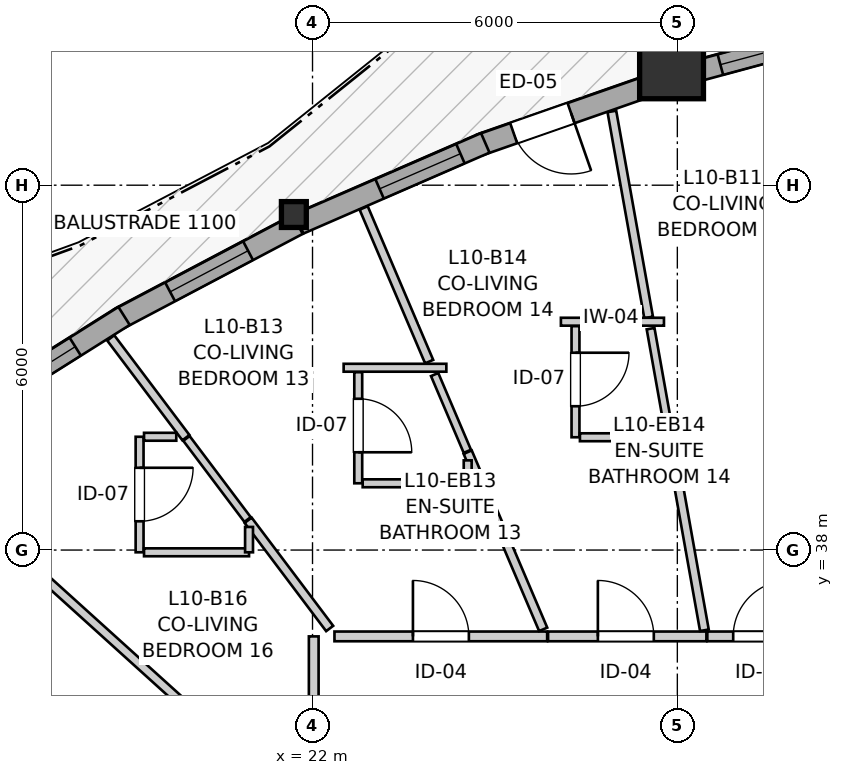
"""IFC4 building model, lengths in metres.
Left out: names, types, materials, properties, quantities, classifications, styles, units other than length and angle.
Written with IfcOpenShell. Run it as: python <this file> out.ifc"""

import sys

from ifc_helpers import new_model, si_unit, direction, frame, frame_2d, origin, origin_2d, place, context, subcontext, project, spatial, rectangle, i_section, extrude, source, transform, mapped, element, fill, save


model = new_model("IFC4")
c1 = context("Model", 3, precision=1e-05, world=origin(), true_north=direction((0.0, 1.0)))
c2 = subcontext(c1, "Body", "Model", "MODEL_VIEW")
j1 = project(units=[si_unit("LENGTHUNIT", "METRE"), si_unit("PLANEANGLEUNIT", "RADIAN")], contexts=[c1])
p1 = place(None, origin())
s1 = spatial("IfcSite", under=j1, at=p1, CompositionType="ELEMENT")
p2 = place(p1, origin())
s2 = spatial("IfcBuilding", under=s1, at=p2, CompositionType="ELEMENT")
p3 = place(p2, frame((0.0, 0.0, 36.6)))
s3 = spatial("IfcBuildingStorey", under=s2, at=p3, CompositionType="ELEMENT", Elevation=36.6)
m1 = source(origin(), c2, "Body", "SweptSolid", [
    extrude(rectangle(XDim=1.05, YDim=1.05, at=origin_2d()), origin(), (0.0, 0.0, 1.0), 2.94),
])
p4 = place(p3, frame((27.905, 45.947, 0.0), z_axis=(0.0, 0.0, 1.0), x_axis=(1.0, 0.0, 0.0)))
e1 = element("IfcColumn", 1, at=p4, inside=s3, PredefinedType="COLUMN", context=c2, shape_type="MappedRepresentation", body=[
    mapped(m1, transform((0.0, 0.0, 0.0), x_axis=(1.0, 0.0, 0.0), y_axis=(0.0, 1.0, 0.0), z_axis=(0.0, 0.0, 1.0), scale=1.0)),
])
m2 = source(origin(), c2, "Body", "SweptSolid", [
    extrude(i_section(OverallWidth=0.409, OverallDepth=0.425, WebThickness=0.03, FlangeThickness=0.048, FilletRadius=0.015, at=origin_2d()), origin(), (0.0, 0.0, 1.0), 2.94),
])
p5 = place(p3, frame((21.693, 43.518, 0.0), z_axis=(0.0, 0.0, 1.0), x_axis=(1.0, 0.0, 0.0)))
e2 = element("IfcColumn", 2, at=p5, inside=s3, PredefinedType="PILASTER", context=c2, shape_type="MappedRepresentation", body=[
    mapped(m2, transform((0.0, 0.0, 0.0), x_axis=(1.0, 0.0, 0.0), y_axis=(0.0, 1.0, 0.0), z_axis=(0.0, 0.0, 1.0), scale=1.0)),
])
p6 = place(p3, frame((31.281, 46.677, 0.0), z_axis=(0.0, 0.0, 1.0), x_axis=(-0.965445661484, -0.260604441101, 0.0)))
e3 = element("IfcWall", 3, at=p6, inside=s3, PredefinedType="SOLIDWALL", context=c2, shape_type="SweptSolid", body=[
    extrude(rectangle(XDim=3.15, YDim=0.35, at=frame_2d((1.575, 0.0))), origin(), (0.0, 0.0, 1.0), 2.42),
])
p7 = place(p6, frame((0.31, 0.0, 0.82)))
e4 = element("IfcOpeningElement", 4, at=p7, cuts=e3, PredefinedType="OPENING", context=c2, shape_type="SweptSolid", body=[
    extrude(rectangle(XDim=0.58, YDim=1.35, at=frame_2d((0.29, 0.675))), frame((0.0, 0.185, 0.0), z_axis=(0.0, -1.0, 0.0), x_axis=(1.0, 0.0, 0.0)), (0.0, 0.0, 1.0), 0.37),
])
p8 = place(p6, frame((1.215, 0.0, 0.82)))
e5 = element("IfcOpeningElement", 5, at=p8, cuts=e3, PredefinedType="OPENING", context=c2, shape_type="SweptSolid", body=[
    extrude(rectangle(XDim=1.45, YDim=1.25, at=frame_2d((0.725, 0.625))), frame((0.0, 0.185, 0.0), z_axis=(0.0, -1.0, 0.0), x_axis=(1.0, 0.0, 0.0)), (0.0, 0.0, 1.0), 0.37),
])
p9 = place(p3, frame((27.679, 45.683, 0.0), z_axis=(0.0, 0.0, 1.0), x_axis=(-0.944147093892, -0.32952430122, 0.0)))
e6 = element("IfcWall", 6, at=p9, inside=s3, PredefinedType="SOLIDWALL", context=c2, shape_type="SweptSolid", body=[
    extrude(rectangle(XDim=3.094, YDim=0.35, at=frame_2d((1.547, 0.0))), origin(), (0.0, 0.0, 1.0), 2.42),
])
p10 = place(p9, frame((1.511, 0.0, 0.0)))
e7 = element("IfcOpeningElement", 7, at=p10, cuts=e6, PredefinedType="OPENING", context=c2, shape_type="SweptSolid", body=[
    extrude(rectangle(XDim=1.0, YDim=2.1, at=frame_2d((0.5, 1.05))), frame((0.0, 0.185, 0.0), z_axis=(0.0, -1.0, 0.0), x_axis=(1.0, 0.0, 0.0)), (0.0, 0.0, 1.0), 0.37),
])
p11 = place(p3, frame((24.841, 44.696, 0.0), z_axis=(0.0, 0.0, 1.0), x_axis=(-0.917061912289, -0.398744842009, 0.0)))
e8 = element("IfcWall", 8, at=p11, inside=s3, PredefinedType="SOLIDWALL", context=c2, shape_type="SweptSolid", body=[
    extrude(rectangle(XDim=3.336, YDim=0.35, at=frame_2d((1.668, 0.0))), origin(), (0.0, 0.0, 1.0), 2.42),
])
p12 = place(p11, frame((0.445, 0.0, 0.82)))
e9 = element("IfcOpeningElement", 9, at=p12, cuts=e8, PredefinedType="OPENING", context=c2, shape_type="SweptSolid", body=[
    extrude(rectangle(XDim=1.45, YDim=1.25, at=frame_2d((0.725, 0.625))), frame((0.0, 0.185, 0.0), z_axis=(0.0, -1.0, 0.0), x_axis=(1.0, 0.0, 0.0)), (0.0, 0.0, 1.0), 0.37),
])
p13 = place(p3, frame((21.757, 43.354, 0.0), z_axis=(0.0, 0.0, 1.0), x_axis=(-0.884394035355, -0.466741031224, 0.0)))
e10 = element("IfcWall", 10, at=p13, inside=s3, PredefinedType="SOLIDWALL", context=c2, shape_type="SweptSolid", body=[
    extrude(rectangle(XDim=3.317, YDim=0.35, at=frame_2d((1.659, 0.0))), origin(), (0.0, 0.0, 1.0), 2.42),
])
p14 = place(p13, frame((0.924, 0.0, 0.82)))
e11 = element("IfcOpeningElement", 11, at=p14, cuts=e10, PredefinedType="OPENING", context=c2, shape_type="SweptSolid", body=[
    extrude(rectangle(XDim=1.45, YDim=1.25, at=frame_2d((0.725, 0.625))), frame((0.0, 0.185, 0.0), z_axis=(0.0, -1.0, 0.0), x_axis=(1.0, 0.0, 0.0)), (0.0, 0.0, 1.0), 0.37),
])
p15 = place(p3, frame((18.901, 41.85, 0.0), z_axis=(0.0, 0.0, 1.0), x_axis=(-0.846436796602, -0.532489201167, 0.0)))
e12 = element("IfcWall", 12, at=p15, inside=s3, PredefinedType="SOLIDWALL", context=c2, shape_type="SweptSolid", body=[
    extrude(rectangle(XDim=3.038, YDim=0.35, at=frame_2d((1.519, 0.0))), origin(), (0.0, 0.0, 1.0), 2.42),
])
p16 = place(p15, frame((0.948, 0.0, 0.82)))
e13 = element("IfcOpeningElement", 13, at=p16, cuts=e12, PredefinedType="OPENING", context=c2, shape_type="SweptSolid", body=[
    extrude(rectangle(XDim=1.45, YDim=1.25, at=frame_2d((0.725, 0.625))), frame((0.0, 0.185, 0.0), z_axis=(0.0, -1.0, 0.0), x_axis=(1.0, 0.0, 0.0)), (0.0, 0.0, 1.0), 0.37),
])
p17 = place(p3, frame((22.361, 36.58, 0.0), z_axis=(0.0, 0.0, 1.0), x_axis=(1.0, 0.0, 0.0)))
e14 = element("IfcWall", 14, at=p17, inside=s3, PredefinedType="PARTITIONING", context=c2, shape_type="SweptSolid", body=[
    extrude(rectangle(XDim=3.498, YDim=0.16, at=frame_2d((1.749, 0.0))), origin(), (0.0, 0.0, 1.0), 2.548),
])
p18 = place(p17, frame((1.291, 0.0, 0.0)))
e15 = element("IfcOpeningElement", 15, at=p18, cuts=e14, PredefinedType="OPENING", context=c2, shape_type="SweptSolid", body=[
    extrude(rectangle(XDim=0.92, YDim=2.1, at=frame_2d((0.46, 1.05))), frame((0.0, 0.09, 0.0), z_axis=(0.0, -1.0, 0.0), x_axis=(1.0, 0.0, 0.0)), (0.0, 0.0, 1.0), 0.18),
])
p19 = place(p3, frame((22.02, 33.512, 0.0), z_axis=(0.0, 0.0, 1.0), x_axis=(0.0, 1.0, 0.0)))
e16 = element("IfcWall", 16, at=p19, inside=s3, PredefinedType="PARTITIONING", context=c2, shape_type="SweptSolid", body=[
    extrude(rectangle(XDim=3.068, YDim=0.16, at=frame_2d((1.534, 0.0))), origin(), (0.0, 0.0, 1.0), 2.94),
])
p20 = place(p19, frame((1.084, 0.0, 0.0)))
e17 = element("IfcOpeningElement", 17, at=p20, cuts=e16, PredefinedType="OPENING", context=c2, shape_type="SweptSolid", body=[
    extrude(rectangle(XDim=0.92, YDim=2.1, at=frame_2d((0.46, 1.05))), frame((0.0, 0.09, 0.0), z_axis=(0.0, -1.0, 0.0), x_axis=(1.0, 0.0, 0.0)), (0.0, 0.0, 1.0), 0.18),
])
p21 = place(p3, frame((25.874, 36.58, 0.0), z_axis=(0.0, 0.0, 1.0), x_axis=(1.0, 0.0, 0.0)))
e18 = element("IfcWall", 18, at=p21, inside=s3, PredefinedType="PARTITIONING", context=c2, shape_type="SweptSolid", body=[
    extrude(rectangle(XDim=2.604, YDim=0.16, at=frame_2d((1.302, 0.0))), origin(), (0.0, 0.0, 1.0), 2.94),
])
p22 = place(p21, frame((0.819, 0.0, 0.0)))
e19 = element("IfcOpeningElement", 19, at=p22, cuts=e18, PredefinedType="OPENING", context=c2, shape_type="SweptSolid", body=[
    extrude(rectangle(XDim=0.92, YDim=2.1, at=frame_2d((0.46, 1.05))), frame((0.0, 0.09, 0.0), z_axis=(0.0, -1.0, 0.0), x_axis=(1.0, 0.0, 0.0)), (0.0, 0.0, 1.0), 0.18),
])
p23 = place(p3, frame((26.325, 41.682, 0.0), z_axis=(0.0, 0.0, 1.0), x_axis=(0.0, -1.0, 0.0)))
e20 = element("IfcWall", 20, at=p23, inside=s3, PredefinedType="PARTITIONING", context=c2, shape_type="SweptSolid", body=[
    extrude(rectangle(XDim=1.827, YDim=0.13, at=frame_2d((0.914, 0.0))), origin(), (0.0, 0.0, 1.0), 2.94),
])
p24 = place(p23, frame((0.437, 0.0, 0.0)))
e21 = element("IfcOpeningElement", 21, at=p24, cuts=e20, PredefinedType="OPENING", context=c2, shape_type="SweptSolid", body=[
    extrude(rectangle(XDim=0.88, YDim=2.05, at=frame_2d((0.44, 1.025))), frame((0.0, 0.075, 0.0), z_axis=(0.0, -1.0, 0.0), x_axis=(1.0, 0.0, 0.0)), (0.0, 0.0, 1.0), 0.15),
])
p25 = place(p3, frame((22.752, 40.925, 0.0), z_axis=(0.0, 0.0, 1.0), x_axis=(0.0, -1.0, 0.0)))
e22 = element("IfcWall", 22, at=p25, inside=s3, PredefinedType="PARTITIONING", context=c2, shape_type="SweptSolid", body=[
    extrude(rectangle(XDim=1.827, YDim=0.13, at=frame_2d((0.914, 0.0))), origin(), (0.0, 0.0, 1.0), 2.94),
])
p26 = place(p25, frame((0.437, 0.0, 0.0)))
e23 = element("IfcOpeningElement", 23, at=p26, cuts=e22, PredefinedType="OPENING", context=c2, shape_type="SweptSolid", body=[
    extrude(rectangle(XDim=0.88, YDim=2.05, at=frame_2d((0.44, 1.025))), frame((0.0, 0.075, 0.0), z_axis=(0.0, -1.0, 0.0), x_axis=(1.0, 0.0, 0.0)), (0.0, 0.0, 1.0), 0.15),
])
p27 = place(p3, frame((19.156, 39.863, 0.0), z_axis=(0.0, 0.0, 1.0), x_axis=(0.0, -1.0, 0.0)))
e24 = element("IfcWall", 24, at=p27, inside=s3, PredefinedType="PARTITIONING", context=c2, shape_type="SweptSolid", body=[
    extrude(rectangle(XDim=1.9, YDim=0.13, at=frame_2d((0.95, 0.0))), origin(), (0.0, 0.0, 1.0), 2.94),
])
p28 = place(p27, frame((0.51, 0.0, 0.0)))
e25 = element("IfcOpeningElement", 25, at=p28, cuts=e24, PredefinedType="OPENING", context=c2, shape_type="SweptSolid", body=[
    extrude(rectangle(XDim=0.88, YDim=2.05, at=frame_2d((0.44, 1.025))), frame((0.0, 0.075, 0.0), z_axis=(0.0, -1.0, 0.0), x_axis=(1.0, 0.0, 0.0)), (0.0, 0.0, 1.0), 0.15),
])
p29 = place(p3, frame((28.493, 36.58, 0.0), z_axis=(0.0, 0.0, 1.0), x_axis=(1.0, 0.0, 0.0)))
e26 = element("IfcWall", 26, at=p29, inside=s3, PredefinedType="PARTITIONING", context=c2, shape_type="SweptSolid", body=[
    extrude(rectangle(XDim=1.816, YDim=0.16, at=frame_2d((0.908, 0.0))), origin(), (0.0, 0.0, 1.0), 2.94),
])
p30 = place(p29, frame((0.426, 0.0, 0.0)))
e27 = element("IfcOpeningElement", 27, at=p30, cuts=e26, PredefinedType="OPENING", context=c2, shape_type="SweptSolid", body=[
    extrude(rectangle(XDim=0.92, YDim=2.1, at=frame_2d((0.46, 1.05))), frame((0.0, 0.09, 0.0), z_axis=(0.0, -1.0, 0.0), x_axis=(1.0, 0.0, 0.0)), (0.0, 0.0, 1.0), 0.18),
])
p31 = place(p3, frame((12.85, 37.347, 0.0), z_axis=(0.0, 0.0, 1.0), x_axis=(0.839070272759, -0.544023048567, 0.0)))
e28 = element("IfcWall", 28, at=p31, inside=s3, PredefinedType="PARTITIONING", context=c2, shape_type="SweptSolid", body=[
    extrude(rectangle(XDim=10.779, YDim=0.145, at=frame_2d((5.389, 0.0))), origin(), (0.0, 0.0, 1.0), 2.94),
])
p32 = place(p3, frame((15.516, 39.413, 0.0), z_axis=(0.0, 0.0, 1.0), x_axis=(0.741796419009, -0.670625135784, 0.0)))
e29 = element("IfcWall", 29, at=p32, inside=s3, PredefinedType="PARTITIONING", context=c2, shape_type="SweptSolid", body=[
    extrude(rectangle(XDim=8.586, YDim=0.145, at=frame_2d((4.293, 0.0))), origin(), (0.0, 0.0, 1.0), 2.94),
])
p33 = place(p3, frame((26.923, 45.213, 0.0), z_axis=(0.0, 0.0, 1.0), x_axis=(0.175687492323, -0.98444598889, 0.0)))
e30 = element("IfcWall", 30, at=p33, inside=s3, PredefinedType="PARTITIONING", context=c2, shape_type="SweptSolid", body=[
    extrude(rectangle(XDim=3.441, YDim=0.145, at=frame_2d((1.72, 0.0))), origin(), (0.0, 0.0, 1.0), 2.94),
])
p34 = place(p3, frame((27.876, 39.87, 0.0), z_axis=(0.0, 0.0, 1.0), x_axis=(0.175655014507, -0.984451784436, 0.0)))
e31 = element("IfcWall", 31, at=p34, inside=s3, PredefinedType="PARTITIONING", context=c2, shape_type="SweptSolid", body=[
    extrude(rectangle(XDim=3.24, YDim=0.145, at=frame_2d((1.62, 0.0))), origin(), (0.0, 0.0, 1.0), 2.94),
])
p35 = place(p3, frame((24.552, 39.61, 0.0), z_axis=(0.0, 0.0, 1.0), x_axis=(0.391974411108, -0.919976119819, 0.0)))
e32 = element("IfcWall", 32, at=p35, inside=s3, PredefinedType="PARTITIONING", context=c2, shape_type="SweptSolid", body=[
    extrude(rectangle(XDim=3.168, YDim=0.145, at=frame_2d((1.584, 0.0))), origin(), (0.0, 0.0, 1.0), 2.94),
])
p36 = place(p3, frame((22.841, 43.626, 0.0), z_axis=(0.0, 0.0, 1.0), x_axis=(0.392030625658, -0.919952166445, 0.0)))
e33 = element("IfcWall", 33, at=p36, inside=s3, PredefinedType="PARTITIONING", context=c2, shape_type="SweptSolid", body=[
    extrude(rectangle(XDim=2.747, YDim=0.145, at=frame_2d((1.374, 0.0))), origin(), (0.0, 0.0, 1.0), 2.94),
])
p37 = place(p3, frame((20.941, 38.49, 0.0), z_axis=(0.0, 0.0, 1.0), x_axis=(0.601733790382, -0.798696716853, 0.0)))
e34 = element("IfcWall", 34, at=p37, inside=s3, PredefinedType="PARTITIONING", context=c2, shape_type="SweptSolid", body=[
    extrude(rectangle(XDim=2.229, YDim=0.145, at=frame_2d((1.114, 0.0))), origin(), (0.0, 0.0, 1.0), 2.94),
])
p38 = place(p3, frame((18.681, 41.489, 0.0), z_axis=(0.0, 0.0, 1.0), x_axis=(0.601842551228, -0.79861476541, 0.0)))
e35 = element("IfcWall", 35, at=p38, inside=s3, PredefinedType="PARTITIONING", context=c2, shape_type="SweptSolid", body=[
    extrude(rectangle(XDim=2.055, YDim=0.145, at=frame_2d((1.027, 0.0))), origin(), (0.0, 0.0, 1.0), 2.94),
])
p39 = place(p3, frame((27.56, 41.641, 0.0), z_axis=(0.0, 0.0, 1.0), x_axis=(0.175463771609, -0.9844858886, 0.0)))
e36 = element("IfcWall", 36, at=p39, inside=s3, PredefinedType="PARTITIONING", context=c2, shape_type="SweptSolid", body=[
    extrude(rectangle(XDim=1.784, YDim=0.13, at=frame_2d((0.892, 0.0))), origin(), (0.0, 0.0, 1.0), 2.94),
])
p40 = place(p3, frame((22.825, 39.098, 0.0), z_axis=(0.0, 0.0, 1.0), x_axis=(1.0, 0.0, 0.0)))
e37 = element("IfcWall", 37, at=p40, inside=s3, PredefinedType="PARTITIONING", context=c2, shape_type="SweptSolid", body=[
    extrude(rectangle(XDim=1.727, YDim=0.13, at=frame_2d((0.864, 0.0))), origin(), (0.0, 0.0, 1.0), 2.94),
])
p41 = place(p3, frame((19.229, 37.963, 0.0), z_axis=(0.0, 0.0, 1.0), x_axis=(1.0, 0.0, 0.0)))
e38 = element("IfcWall", 38, at=p41, inside=s3, PredefinedType="PARTITIONING", context=c2, shape_type="SweptSolid", body=[
    extrude(rectangle(XDim=1.727, YDim=0.13, at=frame_2d((0.864, 0.0))), origin(), (0.0, 0.0, 1.0), 2.508),
])
p42 = place(p3, frame((19.927, 39.836, 0.0), z_axis=(0.0, 0.0, 1.0), x_axis=(0.601846185739, -0.798612026401, 0.0)))
e39 = element("IfcWall", 39, at=p42, inside=s3, PredefinedType="PARTITIONING", context=c2, shape_type="SweptSolid", body=[
    extrude(rectangle(XDim=1.67, YDim=0.13, at=frame_2d((0.835, 0.0))), origin(), (0.0, 0.0, 1.0), 2.94),
])
p43 = place(p3, frame((26.398, 39.855, 0.0), z_axis=(0.0, 0.0, 1.0), x_axis=(1.0, 0.0, 0.0)))
e40 = element("IfcWall", 40, at=p43, inside=s3, PredefinedType="PARTITIONING", context=c2, shape_type="SweptSolid", body=[
    extrude(rectangle(XDim=1.388, YDim=0.13, at=frame_2d((0.694, 0.0))), origin(), (0.0, 0.0, 1.0), 2.94),
])
p44 = place(p3, frame((24.009, 40.886, 0.0), z_axis=(0.0, 0.0, 1.0), x_axis=(0.39172821254, -0.920080978773, 0.0)))
e41 = element("IfcWall", 41, at=p44, inside=s3, PredefinedType="PARTITIONING", context=c2, shape_type="SweptSolid", body=[
    extrude(rectangle(XDim=1.372, YDim=0.13, at=frame_2d((0.686, 0.0))), origin(), (0.0, 0.0, 1.0), 2.94),
])
p45 = place(p3, frame((26.085, 41.755, 0.0), z_axis=(0.0, 0.0, 1.0), x_axis=(1.0, 0.0, 0.0)))
e42 = element("IfcWall", 42, at=p45, inside=s3, PredefinedType="PARTITIONING", context=c2, shape_type="SweptSolid", body=[
    extrude(rectangle(XDim=1.695, YDim=0.13, at=frame_2d((0.848, 0.0))), origin(), (0.0, 0.0, 1.0), 2.508),
])
p46 = place(p3, frame((22.512, 40.998, 0.0), z_axis=(0.0, 0.0, 1.0), x_axis=(1.0, 0.0, 0.0)))
e43 = element("IfcWall", 43, at=p46, inside=s3, PredefinedType="PARTITIONING", context=c2, shape_type="SweptSolid", body=[
    extrude(rectangle(XDim=1.689, YDim=0.13, at=frame_2d((0.844, 0.0))), origin(), (0.0, 0.0, 1.0), 2.94),
])
p47 = place(p3, frame((19.229, 39.863, 0.0), z_axis=(0.0, 0.0, 1.0), x_axis=(1.0, 0.0, 0.0)))
e44 = element("IfcWall", 44, at=p47, inside=s3, PredefinedType="PARTITIONING", context=c2, shape_type="SweptSolid", body=[
    extrude(rectangle(XDim=0.53, YDim=0.13, at=frame_2d((0.265, 0.0))), origin(), (0.0, 0.0, 1.0), 2.94),
])
p48 = place(p3, frame((24.552, 39.098, 0.0), z_axis=(0.0, 0.0, 1.0), x_axis=(0.0, 1.0, 0.0)))
e45 = element("IfcWall", 45, at=p48, inside=s3, PredefinedType="PARTITIONING", context=c2, shape_type="SweptSolid", body=[
    extrude(rectangle(XDim=0.377, YDim=0.13, at=frame_2d((0.188, 0.0))), origin(), (0.0, 0.0, 1.0), 2.94),
])
p49 = place(p3, frame((20.956, 37.963, 0.0), z_axis=(0.0, 0.0, 1.0), x_axis=(0.0, 1.0, 0.0)))
e46 = element("IfcWall", 46, at=p49, inside=s3, PredefinedType="PARTITIONING", context=c2, shape_type="SweptSolid", body=[
    extrude(rectangle(XDim=0.417, YDim=0.13, at=frame_2d((0.208, 0.0))), origin(), (0.0, 0.0, 1.0), 2.94),
])
m3 = source(origin(), c2, "Body", "SweptSolid", [
    extrude(rectangle(XDim=1.45, YDim=1.25, at=frame_2d((0.725, 0.625))), frame((0.0, 0.03, 0.0), z_axis=(0.0, -1.0, 0.0), x_axis=(1.0, 0.0, 0.0)), (0.0, 0.0, 1.0), 0.06),
])
p50 = place(p8, origin())
e47 = element("IfcWindow", 47, at=p50, inside=s3, PartitioningType="SINGLE_PANEL", PredefinedType="WINDOW", context=c2, shape_type="MappedRepresentation", body=[
    mapped(m3, transform((0.0, 0.0, 0.0), x_axis=(1.0, 0.0, 0.0), y_axis=(0.0, 1.0, 0.0), z_axis=(0.0, 0.0, 1.0), scale=1.0)),
])
fill(e5, e47)
p51 = place(p12, origin())
e48 = element("IfcWindow", 48, at=p51, inside=s3, PartitioningType="SINGLE_PANEL", PredefinedType="WINDOW", context=c2, shape_type="MappedRepresentation", body=[
    mapped(m3, transform((0.0, 0.0, 0.0), x_axis=(1.0, 0.0, 0.0), y_axis=(0.0, 1.0, 0.0), z_axis=(0.0, 0.0, 1.0), scale=1.0)),
])
fill(e9, e48)
p52 = place(p14, origin())
e49 = element("IfcWindow", 49, at=p52, inside=s3, PartitioningType="SINGLE_PANEL", PredefinedType="WINDOW", context=c2, shape_type="MappedRepresentation", body=[
    mapped(m3, transform((0.0, 0.0, 0.0), x_axis=(1.0, 0.0, 0.0), y_axis=(0.0, 1.0, 0.0), z_axis=(0.0, 0.0, 1.0), scale=1.0)),
])
fill(e11, e49)
p53 = place(p16, origin())
e50 = element("IfcWindow", 50, at=p53, inside=s3, PartitioningType="SINGLE_PANEL", PredefinedType="WINDOW", context=c2, shape_type="MappedRepresentation", body=[
    mapped(m3, transform((0.0, 0.0, 0.0), x_axis=(1.0, 0.0, 0.0), y_axis=(0.0, 1.0, 0.0), z_axis=(0.0, 0.0, 1.0), scale=1.0)),
])
fill(e13, e50)
m4 = source(origin(), c2, "Body", "SweptSolid", [
    extrude(rectangle(XDim=1.0, YDim=2.1, at=frame_2d((0.5, 1.05))), frame((0.0, 0.025, 0.0), z_axis=(0.0, -1.0, 0.0), x_axis=(1.0, 0.0, 0.0)), (0.0, 0.0, 1.0), 0.05),
])
p54 = place(p10, origin())
e51 = element("IfcDoor", 51, at=p54, inside=s3, OperationType="SINGLE_SWING_LEFT", PredefinedType="DOOR", context=c2, shape_type="MappedRepresentation", body=[
    mapped(m4, transform((0.0, 0.0, 0.0), x_axis=(1.0, 0.0, 0.0), y_axis=(0.0, 1.0, 0.0), z_axis=(0.0, 0.0, 1.0), scale=1.0)),
])
fill(e7, e51)
m5 = source(origin(), c2, "Body", "SweptSolid", [
    extrude(rectangle(XDim=0.92, YDim=2.1, at=frame_2d((0.46, 1.05))), frame((0.0, 0.025, 0.0), z_axis=(0.0, -1.0, 0.0), x_axis=(1.0, 0.0, 0.0)), (0.0, 0.0, 1.0), 0.05),
])
p55 = place(p18, origin())
e52 = element("IfcDoor", 52, at=p55, inside=s3, OperationType="SINGLE_SWING_LEFT", PredefinedType="DOOR", context=c2, shape_type="MappedRepresentation", body=[
    mapped(m5, transform((0.0, 0.0, 0.0), x_axis=(1.0, 0.0, 0.0), y_axis=(0.0, 1.0, 0.0), z_axis=(0.0, 0.0, 1.0), scale=1.0)),
])
fill(e15, e52)
p56 = place(p22, origin())
e53 = element("IfcDoor", 53, at=p56, inside=s3, OperationType="SINGLE_SWING_LEFT", PredefinedType="DOOR", context=c2, shape_type="MappedRepresentation", body=[
    mapped(m5, transform((0.0, 0.0, 0.0), x_axis=(1.0, 0.0, 0.0), y_axis=(0.0, 1.0, 0.0), z_axis=(0.0, 0.0, 1.0), scale=1.0)),
])
fill(e19, e53)
m6 = source(origin(), c2, "Body", "SweptSolid", [
    extrude(rectangle(XDim=0.88, YDim=2.05, at=frame_2d((0.44, 1.025))), frame((0.0, 0.025, 0.0), z_axis=(0.0, -1.0, 0.0), x_axis=(1.0, 0.0, 0.0)), (0.0, 0.0, 1.0), 0.05),
])
p57 = place(p24, origin())
e54 = element("IfcDoor", 54, at=p57, inside=s3, OperationType="SINGLE_SWING_LEFT", PredefinedType="DOOR", context=c2, shape_type="MappedRepresentation", body=[
    mapped(m6, transform((0.0, 0.0, 0.0), x_axis=(1.0, 0.0, 0.0), y_axis=(0.0, 1.0, 0.0), z_axis=(0.0, 0.0, 1.0), scale=1.0)),
])
fill(e21, e54)
p58 = place(p26, origin())
e55 = element("IfcDoor", 55, at=p58, inside=s3, OperationType="SINGLE_SWING_RIGHT", PredefinedType="DOOR", context=c2, shape_type="MappedRepresentation", body=[
    mapped(m6, transform((0.0, 0.0, 0.0), x_axis=(1.0, 0.0, 0.0), y_axis=(0.0, 1.0, 0.0), z_axis=(0.0, 0.0, 1.0), scale=1.0)),
])
fill(e23, e55)
p59 = place(p28, origin())
e56 = element("IfcDoor", 56, at=p59, inside=s3, OperationType="SINGLE_SWING_LEFT", PredefinedType="DOOR", context=c2, shape_type="MappedRepresentation", body=[
    mapped(m6, transform((0.0, 0.0, 0.0), x_axis=(1.0, 0.0, 0.0), y_axis=(0.0, 1.0, 0.0), z_axis=(0.0, 0.0, 1.0), scale=1.0)),
])
fill(e25, e56)
p60 = place(p30, origin())
e57 = element("IfcDoor", 57, at=p60, inside=s3, OperationType="SINGLE_SWING_RIGHT", PredefinedType="DOOR", context=c2, shape_type="MappedRepresentation", body=[
    mapped(m5, transform((0.0, 0.0, 0.0), x_axis=(1.0, 0.0, 0.0), y_axis=(0.0, 1.0, 0.0), z_axis=(0.0, 0.0, 1.0), scale=1.0)),
])
fill(e27, e57)
save(model, sys.argv[1])
